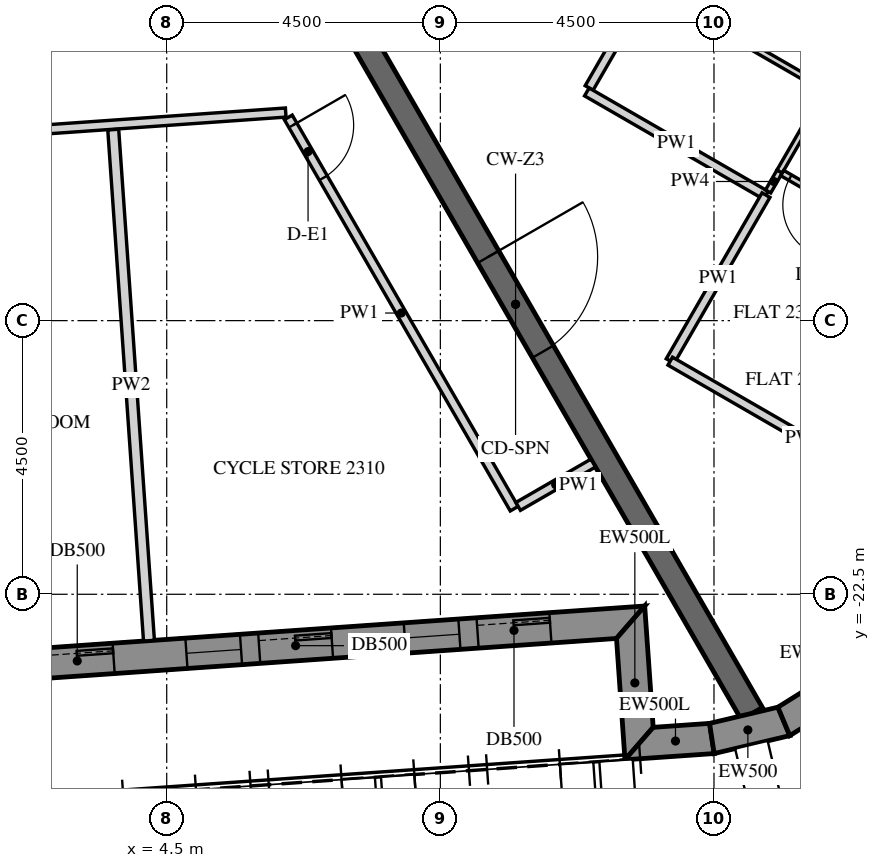
"""IFC4 building model, lengths in metres.
Left out: names, types, materials, properties, quantities, classifications, styles, units other than length and angle.
Written with IfcOpenShell. Run it as: python <this file> out.ifc"""

import sys

from ifc_helpers import new_model, si_unit, direction, frame, frame_2d, origin, place, context, subcontext, project, spatial, polyline, rectangle, outline, extrude, element, fill, save


model = new_model("IFC4")
c1 = context("Model", 3, precision=1e-05, world=origin(), true_north=direction((0.0, 1.0)))
c2 = subcontext(c1, "Body", "Model", "MODEL_VIEW")
j1 = project(units=[si_unit("LENGTHUNIT", "METRE"), si_unit("PLANEANGLEUNIT", "RADIAN")], contexts=[c1])
p1 = place(None, origin())
s1 = spatial("IfcSite", under=j1, at=p1, CompositionType="ELEMENT")
p2 = place(p1, origin())
s2 = spatial("IfcBuilding", under=s1, at=p2, CompositionType="ELEMENT")
p3 = place(p2, frame((0.0, 0.0, 291.3)))
s3 = spatial("IfcBuildingStorey", under=s2, at=p3, CompositionType="ELEMENT", Elevation=291.3)
p4 = place(p3, frame((-10.86, -24.567, -0.15), z_axis=(0.0, 0.0, 1.0), x_axis=(0.997564329317, 0.06975248292, 0.0)))
e1 = element("IfcWall", 1, at=p4, inside=s3, PredefinedType="SOLIDWALL", context=c2, shape_type="SweptSolid", body=[
    extrude(outline(polyline([(0.25, -0.25), (22.795, -0.25), (23.295, 0.25), (-0.25, 0.25), (0.25, -0.25)])), origin(), (0.0, 0.0, 1.0), 3.9),
])
p5 = place(p4, frame((1.323, 0.0, 1.05)))
e2 = element("IfcOpeningElement", 2, at=p5, cuts=e1, PredefinedType="OPENING", context=c2, shape_type="SweptSolid", body=[
    extrude(rectangle(XDim=0.9, YDim=1.5, at=frame_2d((0.45, 0.75))), frame((0.0, 0.26, 0.0), z_axis=(0.0, -1.0, 0.0), x_axis=(1.0, 0.0, 0.0)), (0.0, 0.0, 1.0), 0.52),
])
p6 = place(p4, frame((2.522, 0.0, 0.15)))
e3 = element("IfcOpeningElement", 3, at=p6, cuts=e1, PredefinedType="OPENING", context=c2, shape_type="SweptSolid", body=[
    extrude(rectangle(XDim=1.2, YDim=2.4, at=frame_2d((0.6, 1.2))), frame((0.0, 0.26, 0.0), z_axis=(0.0, -1.0, 0.0), x_axis=(1.0, 0.0, 0.0)), (0.0, 0.0, 1.0), 0.52),
])
p7 = place(p4, frame((4.922, 0.0, 1.05)))
e4 = element("IfcOpeningElement", 4, at=p7, cuts=e1, PredefinedType="OPENING", context=c2, shape_type="SweptSolid", body=[
    extrude(rectangle(XDim=0.9, YDim=1.5, at=frame_2d((0.45, 0.75))), frame((0.0, 0.26, 0.0), z_axis=(0.0, -1.0, 0.0), x_axis=(1.0, 0.0, 0.0)), (0.0, 0.0, 1.0), 0.52),
])
p8 = place(p4, frame((6.122, 0.0, 0.15)))
e5 = element("IfcOpeningElement", 5, at=p8, cuts=e1, PredefinedType="OPENING", context=c2, shape_type="SweptSolid", body=[
    extrude(rectangle(XDim=1.2, YDim=2.4, at=frame_2d((0.6, 1.2))), frame((0.0, 0.26, 0.0), z_axis=(0.0, -1.0, 0.0), x_axis=(1.0, 0.0, 0.0)), (0.0, 0.0, 1.0), 0.52),
])
p9 = place(p4, frame((8.522, 0.0, 1.05)))
e6 = element("IfcOpeningElement", 6, at=p9, cuts=e1, PredefinedType="OPENING", context=c2, shape_type="SweptSolid", body=[
    extrude(rectangle(XDim=0.9, YDim=1.5, at=frame_2d((0.45, 0.75))), frame((0.0, 0.26, 0.0), z_axis=(0.0, -1.0, 0.0), x_axis=(1.0, 0.0, 0.0)), (0.0, 0.0, 1.0), 0.52),
])
p10 = place(p4, frame((9.722, 0.0, 0.15)))
e7 = element("IfcOpeningElement", 7, at=p10, cuts=e1, PredefinedType="OPENING", context=c2, shape_type="SweptSolid", body=[
    extrude(rectangle(XDim=1.2, YDim=2.4, at=frame_2d((0.6, 1.2))), frame((0.0, 0.26, 0.0), z_axis=(0.0, -1.0, 0.0), x_axis=(1.0, 0.0, 0.0)), (0.0, 0.0, 1.0), 0.52),
])
p11 = place(p4, frame((12.122, 0.0, 1.05)))
e8 = element("IfcOpeningElement", 8, at=p11, cuts=e1, PredefinedType="OPENING", context=c2, shape_type="SweptSolid", body=[
    extrude(rectangle(XDim=0.9, YDim=1.5, at=frame_2d((0.45, 0.75))), frame((0.0, 0.26, 0.0), z_axis=(0.0, -1.0, 0.0), x_axis=(1.0, 0.0, 0.0)), (0.0, 0.0, 1.0), 0.52),
])
p12 = place(p4, frame((13.323, 0.0, 0.15)))
e9 = element("IfcOpeningElement", 9, at=p12, cuts=e1, PredefinedType="OPENING", context=c2, shape_type="SweptSolid", body=[
    extrude(rectangle(XDim=1.2, YDim=2.4, at=frame_2d((0.6, 1.2))), frame((0.0, 0.26, 0.0), z_axis=(0.0, -1.0, 0.0), x_axis=(1.0, 0.0, 0.0)), (0.0, 0.0, 1.0), 0.52),
])
p13 = place(p4, frame((15.722, 0.0, 1.05)))
e10 = element("IfcOpeningElement", 10, at=p13, cuts=e1, PredefinedType="OPENING", context=c2, shape_type="SweptSolid", body=[
    extrude(rectangle(XDim=0.9, YDim=1.5, at=frame_2d((0.45, 0.75))), frame((0.0, 0.26, 0.0), z_axis=(0.0, -1.0, 0.0), x_axis=(1.0, 0.0, 0.0)), (0.0, 0.0, 1.0), 0.52),
])
p14 = place(p4, frame((16.922, 0.0, 0.15)))
e11 = element("IfcOpeningElement", 11, at=p14, cuts=e1, PredefinedType="OPENING", context=c2, shape_type="SweptSolid", body=[
    extrude(rectangle(XDim=1.2, YDim=2.4, at=frame_2d((0.6, 1.2))), frame((0.0, 0.26, 0.0), z_axis=(0.0, -1.0, 0.0), x_axis=(1.0, 0.0, 0.0)), (0.0, 0.0, 1.0), 0.52),
])
p15 = place(p4, frame((19.323, 0.0, 1.05)))
e12 = element("IfcOpeningElement", 12, at=p15, cuts=e1, PredefinedType="OPENING", context=c2, shape_type="SweptSolid", body=[
    extrude(rectangle(XDim=0.9, YDim=1.5, at=frame_2d((0.45, 0.75))), frame((0.0, 0.26, 0.0), z_axis=(0.0, -1.0, 0.0), x_axis=(1.0, 0.0, 0.0)), (0.0, 0.0, 1.0), 0.52),
])
p16 = place(p4, frame((20.522, 0.0, 0.15)))
e13 = element("IfcOpeningElement", 13, at=p16, cuts=e1, PredefinedType="OPENING", context=c2, shape_type="SweptSolid", body=[
    extrude(rectangle(XDim=1.2, YDim=2.4, at=frame_2d((0.6, 1.2))), frame((0.0, 0.26, 0.0), z_axis=(0.0, -1.0, 0.0), x_axis=(1.0, 0.0, 0.0)), (0.0, 0.0, 1.0), 0.52),
])
p17 = place(p3, frame((12.129, -22.96, -0.15), z_axis=(0.0, 0.0, 1.0), x_axis=(0.069824268692, -0.99755930726, 0.0)))
e14 = element("IfcWall", 14, at=p17, inside=s3, PredefinedType="SOLIDWALL", context=c2, shape_type="SweptSolid", body=[
    extrude(outline(polyline([(0.25, -0.25), (2.25, -0.25), (1.75, 0.25), (-0.25, 0.25), (0.25, -0.25)])), origin(), (0.0, 0.0, 1.0), 3.9),
])
p18 = place(p3, frame((12.268, -24.955, -0.15), z_axis=(0.0, 0.0, 1.0), x_axis=(0.997561942506, 0.06978660948, 0.0)))
e15 = element("IfcWall", 15, at=p18, inside=s3, PredefinedType="SOLIDWALL", context=c2, shape_type="SweptSolid", body=[
    extrude(outline(polyline([(-0.25, -0.25), (1.22, -0.25), (1.179, 0.25), (0.25, 0.25), (-0.25, -0.25)])), origin(), (0.0, 0.0, 1.0), 3.9),
])
p19 = place(p3, frame((13.465, -24.871, -0.15), z_axis=(0.0, 0.0, 1.0), x_axis=(0.973044740285, 0.230616420501, 0.0)))
e16 = element("IfcWall", 16, at=p19, inside=s3, PredefinedType="SOLIDWALL", context=c2, shape_type="SweptSolid", body=[
    extrude(outline(polyline([(-0.021, -0.25), (1.257, -0.25), (1.175, 0.25), (0.021, 0.25), (-0.021, -0.25)])), origin(), (0.0, 0.0, 1.0), 3.9),
])
p20 = place(p3, frame((14.649, -24.591, -0.15), z_axis=(0.0, 0.0, 1.0), x_axis=(0.848054682072, 0.529908724419, 0.0)))
e17 = element("IfcWall", 17, at=p20, inside=s3, PredefinedType="SOLIDWALL", context=c2, shape_type="SweptSolid", body=[
    extrude(outline(polyline([(-0.041, -0.25), (1.257, -0.25), (1.175, 0.25), (0.041, 0.25), (-0.041, -0.25)])), origin(), (0.0, 0.0, 1.0), 3.9),
])
p21 = place(p3, frame((6.351, -11.0, -0.15), z_axis=(0.0, 0.0, 1.0), x_axis=(0.499998894578, -0.866026041999, 0.0)))
e18 = element("IfcWall", 18, at=p21, inside=s3, PredefinedType="SHEAR", context=c2, shape_type="SweptSolid", body=[
    extrude(rectangle(XDim=15.544, YDim=0.4, at=frame_2d((7.772, 0.0))), origin(), (0.0, 0.0, 1.0), 3.9),
])
p22 = place(p21, frame((6.872, 0.0, 0.15)))
e19 = element("IfcOpeningElement", 19, at=p22, cuts=e18, PredefinedType="OPENING", context=c2, shape_type="SweptSolid", body=[
    extrude(rectangle(XDim=1.8, YDim=2.4, at=frame_2d((0.9, 1.2))), frame((0.0, 0.21, 0.0), z_axis=(0.0, -1.0, 0.0), x_axis=(1.0, 0.0, 0.0)), (0.0, 0.0, 1.0), 0.42),
])
p23 = place(p3, frame((-10.44, -15.767, 0.0), z_axis=(0.0, 0.0, 1.0), x_axis=(0.997534721961, 0.070174628483, 0.0)))
e20 = element("IfcWall", 20, at=p23, inside=s3, PredefinedType="PARTITIONING", context=c2, shape_type="SweptSolid", body=[
    extrude(rectangle(XDim=16.939, YDim=0.15, at=frame_2d((8.47, 0.0))), origin(), (0.0, 0.0, 1.0), 2.988),
])
p24 = place(p23, frame((4.742, 0.0, 0.0)))
e21 = element("IfcOpeningElement", 21, at=p24, cuts=e20, PredefinedType="OPENING", context=c2, shape_type="SweptSolid", body=[
    extrude(rectangle(XDim=1.0, YDim=2.1, at=frame_2d((0.5, 1.05))), frame((0.0, 0.085, 0.0), z_axis=(0.0, -1.0, 0.0), x_axis=(1.0, 0.0, 0.0)), (0.0, 0.0, 1.0), 0.17),
])
p25 = place(p3, frame((6.5, -14.657, 0.0), z_axis=(0.0, 0.0, 1.0), x_axis=(0.499966098742, -0.8660449758, 0.0)))
e22 = element("IfcWall", 22, at=p25, inside=s3, PredefinedType="PARTITIONING", context=c2, shape_type="SweptSolid", body=[
    extrude(rectangle(XDim=7.431, YDim=0.15, at=frame_2d((3.715, 0.0))), origin(), (0.0, 0.0, 1.0), 2.988),
])
p26 = place(p25, frame((0.15, 0.0, 0.0)))
e23 = element("IfcOpeningElement", 23, at=p26, cuts=e22, PredefinedType="OPENING", context=c2, shape_type="SweptSolid", body=[
    extrude(rectangle(XDim=1.0, YDim=2.1, at=frame_2d((0.5, 1.05))), frame((0.0, 0.085, 0.0), z_axis=(0.0, -1.0, 0.0), x_axis=(1.0, 0.0, 0.0)), (0.0, 0.0, 1.0), 0.17),
])
p27 = place(p3, frame((10.28, -21.055, 0.0), z_axis=(0.0, 0.0, 1.0), x_axis=(0.866020080793, 0.500009219579, 0.0)))
e24 = element("IfcWall", 24, at=p27, inside=s3, PredefinedType="PARTITIONING", context=c2, shape_type="SweptSolid", body=[
    extrude(rectangle(XDim=1.425, YDim=0.15, at=frame_2d((0.712, 0.0))), origin(), (0.0, 0.0, 1.0), 2.988),
])
p28 = place(p3, frame((6.884, -13.052, 0.0), z_axis=(0.0, 0.0, 1.0), x_axis=(-0.997564224443, -0.069753982764, 0.0)))
e25 = element("IfcWall", 25, at=p28, inside=s3, PredefinedType="PARTITIONING", context=c2, shape_type="SweptSolid", body=[
    extrude(rectangle(XDim=16.618, YDim=0.15, at=frame_2d((8.309, 0.0))), origin(), (0.0, 0.0, 1.0), 2.988),
])
p29 = place(p28, frame((7.859, 0.0, 0.0)))
e26 = element("IfcOpeningElement", 26, at=p29, cuts=e25, PredefinedType="OPENING", context=c2, shape_type="SweptSolid", body=[
    extrude(rectangle(XDim=0.9, YDim=2.1, at=frame_2d((0.45, 1.05))), frame((0.0, 0.085, 0.0), z_axis=(0.0, -1.0, 0.0), x_axis=(1.0, 0.0, 0.0)), (0.0, 0.0, 1.0), 0.17),
])
p30 = place(p3, frame((11.447, -14.174, 0.0), z_axis=(0.0, 0.0, 1.0), x_axis=(0.500003306199, 0.866023494941, 0.0)))
e27 = element("IfcWall", 27, at=p30, inside=s3, PredefinedType="PARTITIONING", context=c2, shape_type="SweptSolid", body=[
    extrude(rectangle(XDim=14.949, YDim=0.15, at=frame_2d((7.475, 0.0))), origin(), (0.0, 0.0, 1.0), 2.988),
])
p31 = place(p30, frame((2.325, 0.0, 0.0)))
e28 = element("IfcOpeningElement", 28, at=p31, cuts=e27, PredefinedType="OPENING", context=c2, shape_type="SweptSolid", body=[
    extrude(rectangle(XDim=1.0, YDim=2.1, at=frame_2d((0.5, 1.05))), frame((0.0, 0.085, 0.0), z_axis=(0.0, -1.0, 0.0), x_axis=(1.0, 0.0, 0.0)), (0.0, 0.0, 1.0), 0.17),
])
p32 = place(p30, frame((12.177, 0.0, 0.0)))
e29 = element("IfcOpeningElement", 29, at=p32, cuts=e27, PredefinedType="OPENING", context=c2, shape_type="SweptSolid", body=[
    extrude(rectangle(XDim=1.0, YDim=2.1, at=frame_2d((0.5, 1.05))), frame((0.0, 0.085, 0.0), z_axis=(0.0, -1.0, 0.0), x_axis=(1.0, 0.0, 0.0)), (0.0, 0.0, 1.0), 0.17),
])
p33 = place(p3, frame((14.354, -15.939, 0.0), z_axis=(0.0, 0.0, 1.0), x_axis=(-0.866020560687, 0.500008388397, 0.0)))
e30 = element("IfcWall", 30, at=p33, inside=s3, PredefinedType="PARTITIONING", context=c2, shape_type="SweptSolid", body=[
    extrude(rectangle(XDim=3.4, YDim=0.15, at=frame_2d((1.7, 0.0))), origin(), (0.0, 0.0, 1.0), 2.988),
])
p34 = place(p3, frame((12.78, -18.665, 0.0), z_axis=(0.0, 0.0, 1.0), x_axis=(0.499972881236, 0.866041060244, 0.0)))
e31 = element("IfcWall", 31, at=p34, inside=s3, PredefinedType="PARTITIONING", context=c2, shape_type="SweptSolid", body=[
    extrude(rectangle(XDim=3.151, YDim=0.15, at=frame_2d((1.575, 0.0))), origin(), (0.0, 0.0, 1.0), 2.988),
])
p35 = place(p3, frame((17.196, -21.216, 0.0), z_axis=(0.0, 0.0, 1.0), x_axis=(-0.866024511559, 0.500001545377, 0.0)))
e32 = element("IfcWall", 32, at=p35, inside=s3, PredefinedType="PARTITIONING", context=c2, shape_type="SweptSolid", body=[
    extrude(rectangle(XDim=5.099, YDim=0.15, at=frame_2d((2.549, 0.0))), origin(), (0.0, 0.0, 1.0), 2.988),
])
p36 = place(p3, frame((4.208, -23.263, 0.0), z_axis=(0.0, 0.0, 1.0), x_axis=(-0.069749826803, 0.997564515037, 0.0)))
e33 = element("IfcWall", 33, at=p36, inside=s3, PredefinedType="PARTITIONING", context=c2, shape_type="SweptSolid", body=[
    extrude(rectangle(XDim=8.425, YDim=0.18, at=frame_2d((4.212, 0.0))), origin(), (0.0, 0.0, 1.0), 2.988),
])
p37 = place(p3, frame((12.474, -12.544, 0.0), z_axis=(0.0, 0.0, 1.0), x_axis=(0.866002163101, -0.500040251884, 0.0)))
e34 = element("IfcWall", 34, at=p37, inside=s3, PredefinedType="PARTITIONING", context=c2, shape_type="SweptSolid", body=[
    extrude(rectangle(XDim=3.325, YDim=0.1, at=frame_2d((1.663, 0.0))), origin(), (0.0, 0.0, 1.0), 2.988),
])
p38 = place(p37, frame((1.225, 0.0, 0.0)))
e35 = element("IfcOpeningElement", 35, at=p38, cuts=e34, PredefinedType="OPENING", context=c2, shape_type="SweptSolid", body=[
    extrude(rectangle(XDim=0.8, YDim=2.1, at=frame_2d((0.4, 1.05))), frame((0.0, 0.06, 0.0), z_axis=(0.0, -1.0, 0.0), x_axis=(1.0, 0.0, 0.0)), (0.0, 0.0, 1.0), 0.12),
])
p39 = place(p3, frame((14.39, -15.875, 0.0), z_axis=(0.0, 0.0, 1.0), x_axis=(0.500094824054, 0.865970650169, 0.0)))
e36 = element("IfcWall", 36, at=p39, inside=s3, PredefinedType="PARTITIONING", context=c2, shape_type="SweptSolid", body=[
    extrude(rectangle(XDim=0.378, YDim=0.1, at=frame_2d((0.189, 0.0))), origin(), (0.0, 0.0, 1.0), 2.988),
])
p40 = place(p3, frame((14.579, -15.548, 0.0), z_axis=(0.0, 0.0, 1.0), x_axis=(0.499949632511, 0.866054481515, 0.0)))
e37 = element("IfcWall", 37, at=p40, inside=s3, PredefinedType="PARTITIONING", context=c2, shape_type="SweptSolid", body=[
    extrude(rectangle(XDim=1.551, YDim=0.1, at=frame_2d((0.775, 0.0))), origin(), (0.0, 0.0, 1.0), 2.988),
])
p41 = place(p3, frame((18.996, -18.098, 0.0), z_axis=(0.0, 0.0, 1.0), x_axis=(-0.866039067339, 0.499976333282, 0.0)))
e38 = element("IfcWall", 38, at=p41, inside=s3, PredefinedType="PARTITIONING", context=c2, shape_type="SweptSolid", body=[
    extrude(rectangle(XDim=5.05, YDim=0.1, at=frame_2d((2.525, 0.0))), origin(), (0.0, 0.0, 1.0), 2.988),
])
p42 = place(p41, frame((4.0, 0.0, 0.0)))
e39 = element("IfcOpeningElement", 39, at=p42, cuts=e38, PredefinedType="OPENING", context=c2, shape_type="SweptSolid", body=[
    extrude(rectangle(XDim=0.9, YDim=2.1, at=frame_2d((0.45, 1.05))), frame((0.0, 0.06, 0.0), z_axis=(0.0, -1.0, 0.0), x_axis=(1.0, 0.0, 0.0)), (0.0, 0.0, 1.0), 0.12),
])
p43 = place(p12, frame((0.0, 0.175, 0.0)))
e40 = element("IfcDoor", 40, at=p43, inside=s3, OperationType="SLIDING_TO_LEFT", PredefinedType="DOOR", context=c2, shape_type="SweptSolid", body=[
    extrude(rectangle(XDim=1.2, YDim=2.4, at=frame_2d((0.6, 1.2))), frame((0.0, 0.025, 0.0), z_axis=(0.0, -1.0, 0.0), x_axis=(1.0, 0.0, 0.0)), (0.0, 0.0, 1.0), 0.05),
])
fill(e9, e40)
p44 = place(p13, frame((0.0, 0.18, 0.0)))
e41 = element("IfcWindow", 41, at=p44, inside=s3, PartitioningType="SINGLE_PANEL", PredefinedType="WINDOW", context=c2, shape_type="SweptSolid", body=[
    extrude(rectangle(XDim=0.9, YDim=1.5, at=frame_2d((0.45, 0.75))), frame((0.0, 0.03, 0.0), z_axis=(0.0, -1.0, 0.0), x_axis=(1.0, 0.0, 0.0)), (0.0, 0.0, 1.0), 0.06),
])
fill(e10, e41)
p45 = place(p14, frame((0.0, 0.175, 0.0)))
e42 = element("IfcDoor", 42, at=p45, inside=s3, OperationType="SLIDING_TO_LEFT", PredefinedType="DOOR", context=c2, shape_type="SweptSolid", body=[
    extrude(rectangle(XDim=1.2, YDim=2.4, at=frame_2d((0.6, 1.2))), frame((0.0, 0.025, 0.0), z_axis=(0.0, -1.0, 0.0), x_axis=(1.0, 0.0, 0.0)), (0.0, 0.0, 1.0), 0.05),
])
fill(e11, e42)
p46 = place(p15, frame((0.0, 0.18, 0.0)))
e43 = element("IfcWindow", 43, at=p46, inside=s3, PartitioningType="SINGLE_PANEL", PredefinedType="WINDOW", context=c2, shape_type="SweptSolid", body=[
    extrude(rectangle(XDim=0.9, YDim=1.5, at=frame_2d((0.45, 0.75))), frame((0.0, 0.03, 0.0), z_axis=(0.0, -1.0, 0.0), x_axis=(1.0, 0.0, 0.0)), (0.0, 0.0, 1.0), 0.06),
])
fill(e12, e43)
p47 = place(p16, frame((0.0, 0.175, 0.0)))
e44 = element("IfcDoor", 44, at=p47, inside=s3, OperationType="SLIDING_TO_LEFT", PredefinedType="DOOR", context=c2, shape_type="SweptSolid", body=[
    extrude(rectangle(XDim=1.2, YDim=2.4, at=frame_2d((0.6, 1.2))), frame((0.0, 0.025, 0.0), z_axis=(0.0, -1.0, 0.0), x_axis=(1.0, 0.0, 0.0)), (0.0, 0.0, 1.0), 0.05),
])
fill(e13, e44)
p48 = place(p22, origin())
e45 = element("IfcDoor", 45, at=p48, inside=s3, OperationType="DOUBLE_DOOR_SINGLE_SWING", PredefinedType="DOOR", context=c2, shape_type="SweptSolid", body=[
    extrude(rectangle(XDim=1.8, YDim=2.4, at=frame_2d((0.9, 1.2))), frame((0.0, 0.025, 0.0), z_axis=(0.0, -1.0, 0.0), x_axis=(1.0, 0.0, 0.0)), (0.0, 0.0, 1.0), 0.05),
])
fill(e19, e45)
p49 = place(p26, origin())
e46 = element("IfcDoor", 46, at=p49, inside=s3, OperationType="SINGLE_SWING_RIGHT", PredefinedType="DOOR", context=c2, shape_type="SweptSolid", body=[
    extrude(rectangle(XDim=1.0, YDim=2.1, at=frame_2d((0.5, 1.05))), frame((0.0, 0.025, 0.0), z_axis=(0.0, -1.0, 0.0), x_axis=(1.0, 0.0, 0.0)), (0.0, 0.0, 1.0), 0.05),
])
fill(e23, e46)
p50 = place(p42, origin())
e47 = element("IfcDoor", 47, at=p50, inside=s3, OperationType="SINGLE_SWING_RIGHT", PredefinedType="DOOR", context=c2, shape_type="SweptSolid", body=[
    extrude(rectangle(XDim=0.9, YDim=2.1, at=frame_2d((0.45, 1.05))), frame((0.0, 0.025, 0.0), z_axis=(0.0, -1.0, 0.0), x_axis=(1.0, 0.0, 0.0)), (0.0, 0.0, 1.0), 0.05),
])
fill(e39, e47)
save(model, sys.argv[1])
